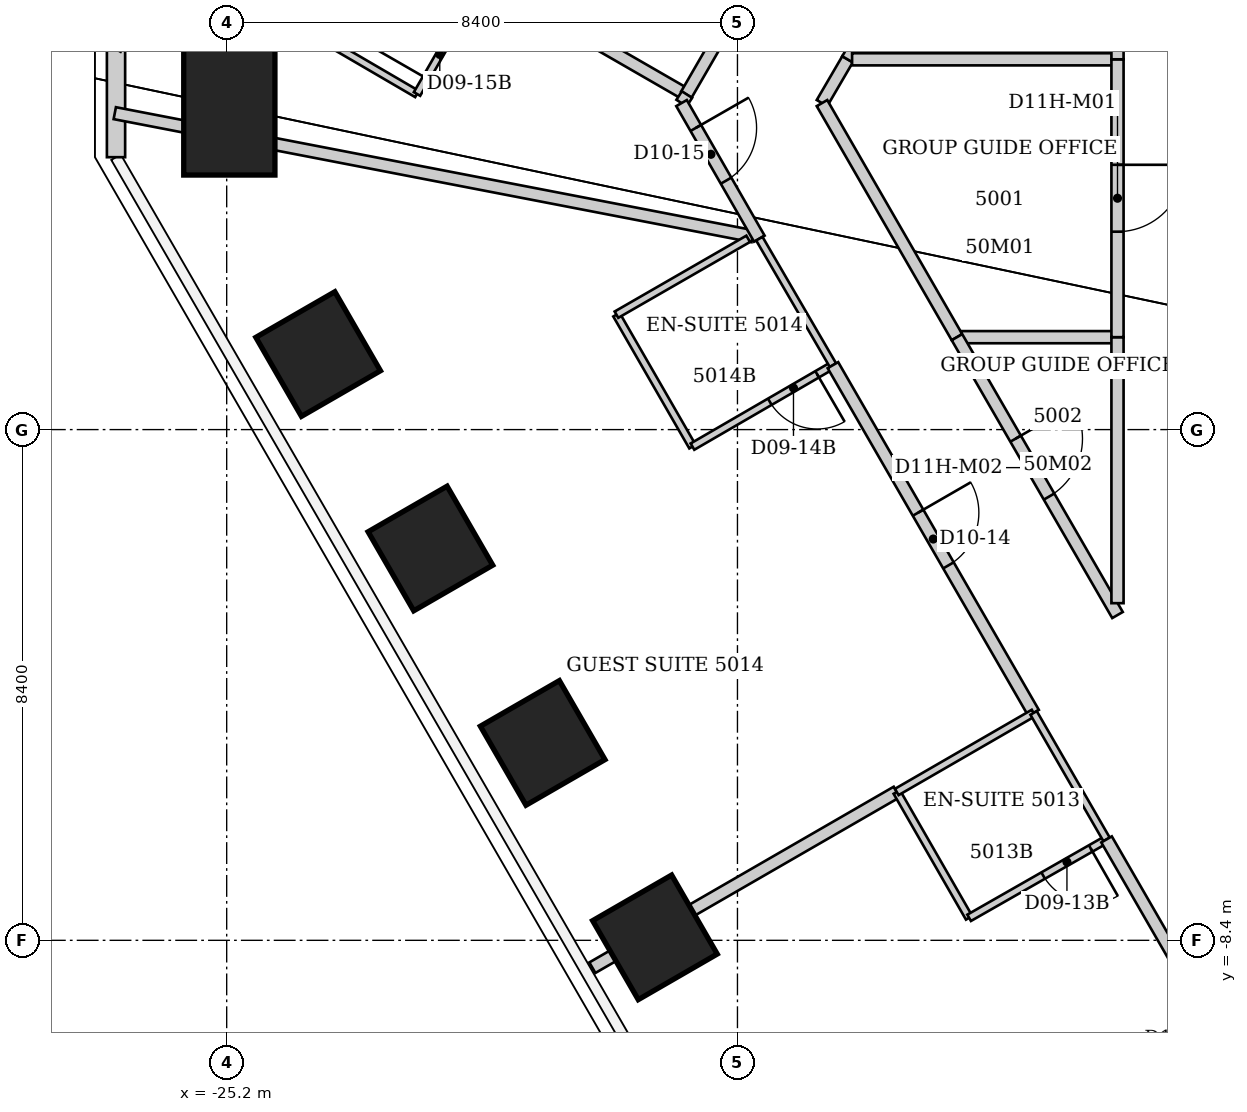
"""IFC4 building model, lengths in metres.
Left out: names, types, materials, properties, quantities, classifications, styles, units other than length and angle.
Written with IfcOpenShell. Run it as: python <this file> out.ifc"""

import sys

from ifc_helpers import new_model, si_unit, direction, frame, frame_2d, origin, origin_2d, place, context, subcontext, project, spatial, rectangle, extrude, element, fill, save


model = new_model("IFC4")
c1 = context("Model", 3, precision=1e-05, world=origin(), true_north=direction((0.0, 1.0)))
c2 = subcontext(c1, "Body", "Model", "MODEL_VIEW")
j1 = project(units=[si_unit("LENGTHUNIT", "METRE"), si_unit("PLANEANGLEUNIT", "RADIAN")], contexts=[c1])
p1 = place(None, origin())
s1 = spatial("IfcSite", under=j1, at=p1, CompositionType="ELEMENT")
p2 = place(p1, origin())
s2 = spatial("IfcBuilding", under=s1, at=p2, CompositionType="ELEMENT")
p3 = place(p2, frame((0.0, 0.0, 202.2)))
s3 = spatial("IfcBuildingStorey", under=s2, at=p3, CompositionType="ELEMENT", Elevation=202.2)
for number, where, z_axis, x_axis in (
    (1, (-18.157, -8.351, 0.0), (0.0, 0.0, 1.0), (-0.866, -0.5, 0.0)),
    (2, (-20.003, -5.153, 0.0), (0.0, 0.0, 1.0), (-0.866, -0.5, 0.0)),
    (3, (-21.85, -1.956, 0.0), (0.0, 0.0, 1.0), (-0.866, -0.5, 0.0)),
    (4, (-23.696, 1.242, 0.0), (0.0, 0.0, 1.0), (-0.866, -0.5, 0.0)),
):
    element("IfcColumn", number, at=place(p3, frame(where, z_axis=z_axis, x_axis=x_axis)), inside=s3, PredefinedType="COLUMN", context=c2, shape_type="SweptSolid", body=[
        extrude(rectangle(XDim=1.5, YDim=1.5, at=origin_2d()), origin(), (0.0, 0.0, 1.0), 3.8),
    ])
p4 = place(p3, frame((-25.156, 5.311, 0.0), z_axis=(0.0, 0.0, 1.0), x_axis=(-1.0, 0.0, 0.0)))
e5 = element("IfcColumn", 5, at=p4, inside=s3, PredefinedType="COLUMN", context=c2, shape_type="SweptSolid", body=[
    extrude(rectangle(XDim=1.5, YDim=2.25, at=origin_2d()), origin(), (0.0, 0.0, 1.0), 3.8),
])
p5 = place(p3, frame((-27.02, 4.48, 0.0), z_axis=(0.0, 0.0, 1.0), x_axis=(0.0, 1.0, 0.0)))
e6 = element("IfcWall", 6, at=p5, inside=s3, PredefinedType="SOLIDWALL", context=c2, shape_type="SweptSolid", body=[
    extrude(rectangle(XDim=1.77, YDim=0.3, at=frame_2d((0.885, 0.0))), origin(), (0.0, 0.0, 1.0), 3.64),
])
p6 = place(p3, frame((-27.041, 5.204, 0.0), z_axis=(0.0, 0.0, 1.0), x_axis=(0.981884490433, -0.18948046719, 0.0)))
e7 = element("IfcWall", 7, at=p6, inside=s3, PredefinedType="PARTITIONING", context=c2, shape_type="SweptSolid", body=[
    extrude(rectangle(XDim=10.684, YDim=0.2, at=frame_2d((5.342, 0.0))), origin(), (0.0, 0.0, 1.0), 3.64),
])
p7 = place(p3, frame((-23.63, 6.43, 0.0), z_axis=(0.0, 0.0, 1.0), x_axis=(0.863773997337, -0.503879431535, 0.0)))
e8 = element("IfcWall", 8, at=p7, inside=s3, PredefinedType="PARTITIONING", context=c2, shape_type="SweptSolid", body=[
    extrude(rectangle(XDim=1.806, YDim=0.12, at=frame_2d((0.903, 0.0))), origin(), (0.0, 0.0, 1.0), 3.64),
])
p8 = place(p3, frame((-22.07, 5.52, 0.0), z_axis=(0.0, 0.0, 1.0), x_axis=(0.499118212815, 0.866533905648, 0.0)))
e9 = element("IfcWall", 9, at=p8, inside=s3, PredefinedType="PARTITIONING", context=c2, shape_type="SweptSolid", body=[
    extrude(rectangle(XDim=2.204, YDim=0.12, at=frame_2d((1.102, 0.0))), origin(), (0.0, 0.0, 1.0), 3.64),
])
p9 = place(p8, frame((0.3, 0.0, 0.0)))
e10 = element("IfcOpeningElement", 10, at=p9, cuts=e9, PredefinedType="OPENING", context=c2, shape_type="SweptSolid", body=[
    extrude(rectangle(XDim=0.9, YDim=2.03, at=frame_2d((0.45, 1.015))), frame((0.0, 0.06, 0.0), z_axis=(0.0, -1.0, 0.0), x_axis=(1.0, 0.0, 0.0)), (0.0, 0.0, 1.0), 0.12),
])
p10 = place(p3, frame((-20.97, 7.43, 0.0), z_axis=(0.0, 0.0, 1.0), x_axis=(0.866325681624, -0.499479542482, 0.0)))
e11 = element("IfcWall", 11, at=p10, inside=s3, PredefinedType="PARTITIONING", context=c2, shape_type="SweptSolid", body=[
    extrude(rectangle(XDim=3.829, YDim=0.2, at=frame_2d((1.914, 0.0))), origin(), (0.0, 0.0, 1.0), 3.64),
])
p11 = place(p3, frame((-19.186, -8.85, 0.0), z_axis=(0.0, 0.0, 1.0), x_axis=(0.866035778077, 0.499982030767, 0.0)))
e12 = element("IfcWall", 12, at=p11, inside=s3, PredefinedType="PARTITIONING", context=c2, shape_type="SweptSolid", body=[
    extrude(rectangle(XDim=5.781, YDim=0.2, at=frame_2d((2.89, 0.0))), origin(), (0.0, 0.0, 1.0), 3.038),
])
p12 = place(p3, frame((-18.79, 1.89, 0.0), z_axis=(0.0, 0.0, 1.0), x_axis=(0.499159685399, -0.866510016372, 0.0)))
e13 = element("IfcWall", 13, at=p12, inside=s3, PredefinedType="PARTITIONING", context=c2, shape_type="SweptSolid", body=[
    extrude(rectangle(XDim=2.504, YDim=0.12, at=frame_2d((1.252, 0.0))), origin(), (0.0, 0.0, 1.0), 3.64),
])
p13 = place(p3, frame((-17.64, 5.51, 0.0), z_axis=(0.0, 0.0, 1.0), x_axis=(0.500468304441, 0.865754859212, 0.0)))
e14 = element("IfcWall", 14, at=p13, inside=s3, PredefinedType="PARTITIONING", context=c2, shape_type="SweptSolid", body=[
    extrude(rectangle(XDim=5.694, YDim=0.2, at=frame_2d((2.847, 0.0))), origin(), (0.0, 0.0, 1.0), 3.64),
])
p14 = place(p13, frame((2.347, 0.0, 0.0)))
e15 = element("IfcOpeningElement", 15, at=p14, cuts=e14, PredefinedType="OPENING", context=c2, shape_type="SweptSolid", body=[
    extrude(rectangle(XDim=1.0, YDim=2.13, at=frame_2d((0.5, 1.065))), frame((0.0, 0.1, 0.0), z_axis=(0.0, -1.0, 0.0), x_axis=(1.0, 0.0, 0.0)), (0.0, 0.0, 1.0), 0.2),
])
p15 = place(p3, frame((-17.63, 5.51, 0.0), z_axis=(0.0, 0.0, 1.0), x_axis=(-0.541424846284, -0.840749151547, 0.0)))
e16 = element("IfcWall", 16, at=p15, inside=s3, PredefinedType="PARTITIONING", context=c2, shape_type="SweptSolid", body=[
    extrude(rectangle(XDim=0.167, YDim=0.2, at=frame_2d((0.083, 0.0))), origin(), (0.0, 0.0, 1.0), 3.64),
])
p16 = place(p3, frame((-17.54, -0.28, 0.0), z_axis=(0.0, 0.0, 1.0), x_axis=(0.86498992408, 0.501789229896, 0.0)))
e17 = element("IfcWall", 17, at=p16, inside=s3, PredefinedType="PARTITIONING", context=c2, shape_type="SweptSolid", body=[
    extrude(rectangle(XDim=2.671, YDim=0.12, at=frame_2d((1.335, 0.0))), origin(), (0.0, 0.0, 1.0), 3.64),
])
p17 = place(p16, frame((1.47, 0.0, 0.0)))
e18 = element("IfcOpeningElement", 18, at=p17, cuts=e17, PredefinedType="OPENING", context=c2, shape_type="SweptSolid", body=[
    extrude(rectangle(XDim=0.9, YDim=2.03, at=frame_2d((0.45, 1.015))), frame((0.0, 0.06, 0.0), z_axis=(0.0, -1.0, 0.0), x_axis=(1.0, 0.0, 0.0)), (0.0, 0.0, 1.0), 0.12),
])
p18 = place(p3, frame((-16.624, 3.138, 0.0), z_axis=(0.0, 0.0, 1.0), x_axis=(-0.866525185869, -0.499133351175, 0.0)))
e19 = element("IfcWall", 19, at=p18, inside=s3, PredefinedType="PARTITIONING", context=c2, shape_type="SweptSolid", body=[
    extrude(rectangle(XDim=2.5, YDim=0.12, at=frame_2d((1.25, 0.0))), origin(), (0.0, 0.0, 1.0), 3.038),
])
p19 = place(p3, frame((-16.44, 3.14, 0.0), z_axis=(0.0, 0.0, 1.0), x_axis=(-0.497825198029, 0.867277390578, 0.0)))
e20 = element("IfcWall", 20, at=p19, inside=s3, PredefinedType="PARTITIONING", context=c2, shape_type="SweptSolid", body=[
    extrude(rectangle(XDim=2.571, YDim=0.2, at=frame_2d((1.286, 0.0))), origin(), (0.0, 0.0, 1.0), 3.64),
])
p20 = place(p19, frame((1.1, 0.0, 0.0)))
e21 = element("IfcOpeningElement", 21, at=p20, cuts=e20, PredefinedType="OPENING", context=c2, shape_type="SweptSolid", body=[
    extrude(rectangle(XDim=1.0, YDim=2.13, at=frame_2d((0.5, 1.065))), frame((0.0, 0.1, 0.0), z_axis=(0.0, -1.0, 0.0), x_axis=(1.0, 0.0, 0.0)), (0.0, 0.0, 1.0), 0.2),
])
p21 = place(p3, frame((-16.44, 3.14, 0.0), z_axis=(0.0, 0.0, 1.0), x_axis=(0.502854986947, -0.864370789709, 0.0)))
e22 = element("IfcWall", 22, at=p21, inside=s3, PredefinedType="PARTITIONING", context=c2, shape_type="SweptSolid", body=[
    extrude(rectangle(XDim=2.406, YDim=0.12, at=frame_2d((1.203, 0.0))), origin(), (0.0, 0.0, 1.0), 3.64),
])
p22 = place(p3, frame((-15.41, 5.37, 0.0), z_axis=(0.0, 0.0, 1.0), x_axis=(0.503943891868, 0.863736391412, 0.0)))
e23 = element("IfcWall", 23, at=p22, inside=s3, PredefinedType="PARTITIONING", context=c2, shape_type="SweptSolid", body=[
    extrude(rectangle(XDim=0.833, YDim=0.2, at=frame_2d((0.417, 0.0))), origin(), (0.0, 0.0, 1.0), 3.64),
])
p23 = place(p3, frame((-15.23, 1.06, 0.0), z_axis=(0.0, 0.0, 1.0), x_axis=(0.499729921425, -0.866181277581, 0.0)))
e24 = element("IfcWall", 24, at=p23, inside=s3, PredefinedType="PARTITIONING", context=c2, shape_type="SweptSolid", body=[
    extrude(rectangle(XDim=6.604, YDim=0.2, at=frame_2d((3.302, 0.0))), origin(), (0.0, 0.0, 1.0), 3.64),
])
p24 = place(p23, frame((2.802, 0.0, 0.0)))
e25 = element("IfcOpeningElement", 25, at=p24, cuts=e24, PredefinedType="OPENING", context=c2, shape_type="SweptSolid", body=[
    extrude(rectangle(XDim=1.0, YDim=2.13, at=frame_2d((0.5, 1.065))), frame((0.0, 0.1, 0.0), z_axis=(0.0, -1.0, 0.0), x_axis=(1.0, 0.0, 0.0)), (0.0, 0.0, 1.0), 0.2),
])
p25 = place(p3, frame((-14.99, 6.09, 0.0), z_axis=(0.0, 0.0, 1.0), x_axis=(0.500213626659, 0.86590203124, 0.0)))
e26 = element("IfcWall", 26, at=p25, inside=s3, PredefinedType="PARTITIONING", context=c2, shape_type="SweptSolid", body=[
    extrude(rectangle(XDim=5.278, YDim=0.2, at=frame_2d((2.639, 0.0))), origin(), (0.0, 0.0, 1.0), 3.64),
])
p26 = place(p3, frame((-14.915, 6.09, 0.0), z_axis=(0.0, 0.0, 1.0), x_axis=(1.0, 0.0, 0.0)))
e27 = element("IfcWall", 27, at=p26, inside=s3, PredefinedType="PARTITIONING", context=c2, shape_type="SweptSolid", body=[
    extrude(rectangle(XDim=4.355, YDim=0.2, at=frame_2d((2.177, 0.0))), origin(), (0.0, 0.0, 1.0), 3.64),
])
p27 = place(p3, frame((-14.18, -5.96, 0.0), z_axis=(0.0, 0.0, 1.0), x_axis=(0.49836161924, -0.866969259241, 0.0)))
e28 = element("IfcWall", 28, at=p27, inside=s3, PredefinedType="PARTITIONING", context=c2, shape_type="SweptSolid", body=[
    extrude(rectangle(XDim=2.388, YDim=0.12, at=frame_2d((1.194, 0.0))), origin(), (0.0, 0.0, 1.0), 3.64),
])
p28 = place(p3, frame((-14.18, -5.96, 0.0), z_axis=(0.0, 0.0, 1.0), x_axis=(0.865856933682, 0.500291685314, 0.0)))
e29 = element("IfcWall", 29, at=p28, inside=s3, PredefinedType="PARTITIONING", context=c2, shape_type="SweptSolid", body=[
    extrude(rectangle(XDim=2.599, YDim=0.12, at=frame_2d((1.299, 0.0))), origin(), (0.0, 0.0, 1.0), 3.038),
])
p29 = place(p3, frame((-13.19, 1.52, 0.0), z_axis=(0.0, 0.0, 1.0), x_axis=(-0.499513190454, 0.866306281036, 0.0)))
e30 = element("IfcWall", 30, at=p29, inside=s3, PredefinedType="PARTITIONING", context=c2, shape_type="SweptSolid", body=[
    extrude(rectangle(XDim=4.444, YDim=0.2, at=frame_2d((2.222, 0.0))), origin(), (0.0, 0.0, 1.0), 3.64),
])
p30 = place(p3, frame((-12.99, -8.03, 0.0), z_axis=(0.0, 0.0, 1.0), x_axis=(0.868473984885, 0.49573474518, 0.0)))
e31 = element("IfcWall", 31, at=p30, inside=s3, PredefinedType="PARTITIONING", context=c2, shape_type="SweptSolid", body=[
    extrude(rectangle(XDim=2.602, YDim=0.12, at=frame_2d((1.301, 0.0))), origin(), (0.0, 0.0, 1.0), 3.64),
])
p31 = place(p30, frame((1.402, 0.0, 0.0)))
e32 = element("IfcOpeningElement", 32, at=p31, cuts=e31, PredefinedType="OPENING", context=c2, shape_type="SweptSolid", body=[
    extrude(rectangle(XDim=0.9, YDim=2.03, at=frame_2d((0.45, 1.015))), frame((0.0, 0.06, 0.0), z_axis=(0.0, -1.0, 0.0), x_axis=(1.0, 0.0, 0.0)), (0.0, 0.0, 1.0), 0.12),
])
p32 = place(p3, frame((-11.93, -4.66, 0.0), z_axis=(0.0, 0.0, 1.0), x_axis=(0.499693115345, -0.866202511239, 0.0)))
e33 = element("IfcWall", 33, at=p32, inside=s3, PredefinedType="PARTITIONING", context=c2, shape_type="SweptSolid", body=[
    extrude(rectangle(XDim=2.401, YDim=0.12, at=frame_2d((1.201, 0.0))), origin(), (0.0, 0.0, 1.0), 3.64),
])
p33 = place(p3, frame((-10.73, -6.74, 0.0), z_axis=(0.0, 0.0, 1.0), x_axis=(0.499684370586, -0.866207555839, 0.0)))
e34 = element("IfcWall", 34, at=p33, inside=s3, PredefinedType="PARTITIONING", context=c2, shape_type="SweptSolid", body=[
    extrude(rectangle(XDim=7.585, YDim=0.2, at=frame_2d((3.792, 0.0))), origin(), (0.0, 0.0, 1.0), 3.64),
])
p34 = place(p33, frame((3.292, 0.0, 0.0)))
e35 = element("IfcOpeningElement", 35, at=p34, cuts=e34, PredefinedType="OPENING", context=c2, shape_type="SweptSolid", body=[
    extrude(rectangle(XDim=1.0, YDim=2.13, at=frame_2d((0.5, 1.065))), frame((0.0, 0.1, 0.0), z_axis=(0.0, -1.0, 0.0), x_axis=(1.0, 0.0, 0.0)), (0.0, 0.0, 1.0), 0.2),
])
p35 = place(p3, frame((-10.56, 1.52, 0.0), z_axis=(0.0, 0.0, 1.0), x_axis=(-1.0, 0.0, 0.0)))
e36 = element("IfcWall", 36, at=p35, inside=s3, PredefinedType="PARTITIONING", context=c2, shape_type="SweptSolid", body=[
    extrude(rectangle(XDim=2.56, YDim=0.2, at=frame_2d((1.28, 0.0))), origin(), (0.0, 0.0, 1.0), 3.64),
])
p36 = place(p3, frame((-10.55, -3.05, 0.0), z_axis=(0.0, 0.0, 1.0), x_axis=(-0.500193590286, 0.865913605527, 0.0)))
e37 = element("IfcWall", 37, at=p36, inside=s3, PredefinedType="PARTITIONING", context=c2, shape_type="SweptSolid", body=[
    extrude(rectangle(XDim=5.278, YDim=0.2, at=frame_2d((2.639, 0.0))), origin(), (0.0, 0.0, 1.0), 3.64),
])
p37 = place(p36, frame((2.25, 0.0, 0.0)))
e38 = element("IfcOpeningElement", 38, at=p37, cuts=e37, PredefinedType="OPENING", context=c2, shape_type="SweptSolid", body=[
    extrude(rectangle(XDim=1.1, YDim=2.2, at=frame_2d((0.55, 1.1))), frame((0.0, 0.1, 0.0), z_axis=(0.0, -1.0, 0.0), x_axis=(1.0, 0.0, 0.0)), (0.0, 0.0, 1.0), 0.2),
])
p38 = place(p3, frame((-10.55, 1.52, 0.0), z_axis=(0.0, 0.0, 1.0), x_axis=(0.0, -1.0, 0.0)))
e39 = element("IfcWall", 39, at=p38, inside=s3, PredefinedType="PARTITIONING", context=c2, shape_type="SweptSolid", body=[
    extrude(rectangle(XDim=4.375, YDim=0.2, at=frame_2d((2.188, 0.0))), origin(), (0.0, 0.0, 1.0), 3.64),
])
p39 = place(p3, frame((-10.55, 6.09, 0.0), z_axis=(0.0, 0.0, 1.0), x_axis=(0.0, -1.0, 0.0)))
e40 = element("IfcWall", 40, at=p39, inside=s3, PredefinedType="PARTITIONING", context=c2, shape_type="SweptSolid", body=[
    extrude(rectangle(XDim=4.57, YDim=0.2, at=frame_2d((2.285, 0.0))), origin(), (0.0, 0.0, 1.0), 3.64),
])
p40 = place(p39, frame((1.735, 0.0, 0.0)))
e41 = element("IfcOpeningElement", 41, at=p40, cuts=e40, PredefinedType="OPENING", context=c2, shape_type="SweptSolid", body=[
    extrude(rectangle(XDim=1.1, YDim=2.2, at=frame_2d((0.55, 1.1))), frame((0.0, 0.1, 0.0), z_axis=(0.0, -1.0, 0.0), x_axis=(1.0, 0.0, 0.0)), (0.0, 0.0, 1.0), 0.2),
])
p41 = place(p3, frame((-10.55, 8.89, 0.0), z_axis=(0.0, 0.0, 1.0), x_axis=(0.0, -1.0, 0.0)))
e42 = element("IfcWall", 42, at=p41, inside=s3, PredefinedType="PARTITIONING", context=c2, shape_type="SweptSolid", body=[
    extrude(rectangle(XDim=2.8, YDim=0.2, at=frame_2d((1.4, 0.0))), origin(), (0.0, 0.0, 1.0), 3.64),
])
p42 = place(p31, origin())
e43 = element("IfcDoor", 43, at=p42, inside=s3, OperationType="SINGLE_SWING_RIGHT", PredefinedType="DOOR", context=c2, shape_type="SweptSolid", body=[
    extrude(rectangle(XDim=0.9, YDim=2.03, at=frame_2d((0.45, 1.015))), frame((0.0, 0.025, 0.0), z_axis=(0.0, -1.0, 0.0), x_axis=(1.0, 0.0, 0.0)), (0.0, 0.0, 1.0), 0.05),
])
fill(e32, e43)
p43 = place(p24, origin())
e44 = element("IfcDoor", 44, at=p43, inside=s3, OperationType="SINGLE_SWING_LEFT", PredefinedType="DOOR", context=c2, shape_type="SweptSolid", body=[
    extrude(rectangle(XDim=1.0, YDim=2.13, at=frame_2d((0.5, 1.065))), frame((0.0, 0.025, 0.0), z_axis=(0.0, -1.0, 0.0), x_axis=(1.0, 0.0, 0.0)), (0.0, 0.0, 1.0), 0.05),
])
fill(e25, e44)
p44 = place(p17, origin())
e45 = element("IfcDoor", 45, at=p44, inside=s3, OperationType="SINGLE_SWING_RIGHT", PredefinedType="DOOR", context=c2, shape_type="SweptSolid", body=[
    extrude(rectangle(XDim=0.9, YDim=2.03, at=frame_2d((0.45, 1.015))), frame((0.0, 0.025, 0.0), z_axis=(0.0, -1.0, 0.0), x_axis=(1.0, 0.0, 0.0)), (0.0, 0.0, 1.0), 0.05),
])
fill(e18, e45)
p45 = place(p20, origin())
e46 = element("IfcDoor", 46, at=p45, inside=s3, OperationType="SINGLE_SWING_RIGHT", PredefinedType="DOOR", context=c2, shape_type="SweptSolid", body=[
    extrude(rectangle(XDim=1.0, YDim=2.13, at=frame_2d((0.5, 1.065))), frame((0.0, 0.025, 0.0), z_axis=(0.0, -1.0, 0.0), x_axis=(1.0, 0.0, 0.0)), (0.0, 0.0, 1.0), 0.05),
])
fill(e21, e46)
p46 = place(p9, origin())
e47 = element("IfcDoor", 47, at=p46, inside=s3, OperationType="SINGLE_SWING_LEFT", PredefinedType="DOOR", context=c2, shape_type="SweptSolid", body=[
    extrude(rectangle(XDim=0.9, YDim=2.03, at=frame_2d((0.45, 1.015))), frame((0.0, 0.025, 0.0), z_axis=(0.0, -1.0, 0.0), x_axis=(1.0, 0.0, 0.0)), (0.0, 0.0, 1.0), 0.05),
])
fill(e10, e47)
p47 = place(p40, origin())
e48 = element("IfcDoor", 48, at=p47, inside=s3, OperationType="SINGLE_SWING_LEFT", PredefinedType="DOOR", context=c2, shape_type="SweptSolid", body=[
    extrude(rectangle(XDim=1.1, YDim=2.2, at=frame_2d((0.55, 1.1))), frame((0.0, 0.025, 0.0), z_axis=(0.0, -1.0, 0.0), x_axis=(1.0, 0.0, 0.0)), (0.0, 0.0, 1.0), 0.05),
])
fill(e41, e48)
p48 = place(p37, origin())
e49 = element("IfcDoor", 49, at=p48, inside=s3, OperationType="SINGLE_SWING_RIGHT", PredefinedType="DOOR", context=c2, shape_type="SweptSolid", body=[
    extrude(rectangle(XDim=1.1, YDim=2.2, at=frame_2d((0.55, 1.1))), frame((0.0, 0.025, 0.0), z_axis=(0.0, -1.0, 0.0), x_axis=(1.0, 0.0, 0.0)), (0.0, 0.0, 1.0), 0.05),
])
fill(e38, e49)
save(model, sys.argv[1])
